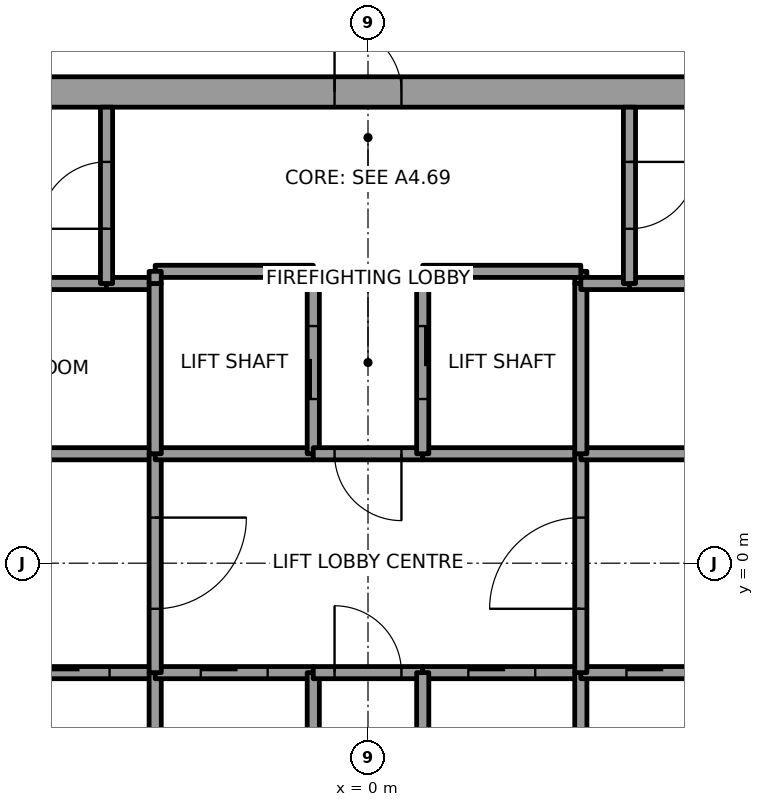
"""IFC4 building model, lengths in metres.
Left out: names, types, materials, properties, quantities, classifications, styles, units other than length and angle.
Written with IfcOpenShell. Run it as: python <this file> out.ifc"""

import sys

from ifc_helpers import new_model, si_unit, direction, frame, frame_2d, origin, place, context, subcontext, project, spatial, rectangle, extrude, element, fill, save


model = new_model("IFC4")
c1 = context("Model", 3, precision=1e-05, world=origin(), true_north=direction((0.0, 1.0)))
c2 = subcontext(c1, "Body", "Model", "MODEL_VIEW")
j1 = project(units=[si_unit("LENGTHUNIT", "METRE"), si_unit("PLANEANGLEUNIT", "RADIAN")], contexts=[c1])
p1 = place(None, origin())
s1 = spatial("IfcSite", under=j1, at=p1, CompositionType="ELEMENT")
p2 = place(p1, origin())
s2 = spatial("IfcBuilding", under=s1, at=p2, CompositionType="ELEMENT")
p3 = place(p2, frame((0.0, 0.0, 295.0)))
s3 = spatial("IfcBuildingStorey", under=s2, at=p3, CompositionType="ELEMENT", Elevation=295.0)
p4 = place(p3, frame((-11.0, 7.75, 0.0), z_axis=(0.0, 0.0, 1.0), x_axis=(1.0, 0.0, 0.0)))
e1 = element("IfcWall", 1, at=p4, inside=s3, PredefinedType="SHEAR", context=c2, shape_type="SweptSolid", body=[
    extrude(rectangle(XDim=22.0, YDim=0.5, at=frame_2d((11.0, 0.0))), origin(), (0.0, 0.0, 1.0), 4.0),
])
p5 = place(p4, frame((10.45, 0.0, 0.0)))
e2 = element("IfcOpeningElement", 2, at=p5, cuts=e1, PredefinedType="OPENING", context=c2, shape_type="SweptSolid", body=[
    extrude(rectangle(XDim=1.1, YDim=2.1, at=frame_2d((0.55, 1.05))), frame((0.0, 0.25, 0.0), z_axis=(0.0, -1.0, 0.0), x_axis=(1.0, 0.0, 0.0)), (0.0, 0.0, 1.0), 0.5),
])
p6 = place(p3, frame((-8.7, 1.8, 0.0), z_axis=(0.0, 0.0, 1.0), x_axis=(1.0, 0.0, 0.0)))
e3 = element("IfcWall", 3, at=p6, inside=s3, PredefinedType="SOLIDWALL", context=c2, shape_type="SweptSolid", body=[
    extrude(rectangle(XDim=5.2, YDim=0.2, at=frame_2d((2.6, 0.0))), origin(), (0.0, 0.0, 1.0), 3.85),
])
p7 = place(p6, frame((2.15, 0.0, 0.0)))
e4 = element("IfcOpeningElement", 4, at=p7, cuts=e3, PredefinedType="OPENING", context=c2, shape_type="SweptSolid", body=[
    extrude(rectangle(XDim=0.9, YDim=2.1, at=frame_2d((0.45, 1.05))), frame((0.0, 0.1, 0.0), z_axis=(0.0, -1.0, 0.0), x_axis=(1.0, 0.0, 0.0)), (0.0, 0.0, 1.0), 0.2),
])
p8 = place(p3, frame((-4.3, 4.6, 0.0), z_axis=(0.0, 0.0, 1.0), x_axis=(-1.0, 0.0, 0.0)))
e5 = element("IfcWall", 5, at=p8, inside=s3, PredefinedType="SOLIDWALL", context=c2, shape_type="SweptSolid", body=[
    extrude(rectangle(XDim=4.4, YDim=0.2, at=frame_2d((2.2, 0.0))), origin(), (0.0, 0.0, 1.0), 3.85),
])
p9 = place(p3, frame((-6.1, -1.8, 0.0), z_axis=(0.0, 0.0, 1.0), x_axis=(1.0, 0.0, 0.0)))
e6 = element("IfcWall", 6, at=p9, inside=s3, PredefinedType="SOLIDWALL", context=c2, shape_type="SweptSolid", body=[
    extrude(rectangle(XDim=2.6, YDim=0.2, at=frame_2d((1.3, 0.0))), origin(), (0.0, 0.0, 1.0), 3.85),
])
p10 = place(p9, frame((0.75, 0.0, 0.0)))
e7 = element("IfcOpeningElement", 7, at=p10, cuts=e6, PredefinedType="OPENING", context=c2, shape_type="SweptSolid", body=[
    extrude(rectangle(XDim=1.1, YDim=2.1, at=frame_2d((0.55, 1.05))), frame((0.0, 0.1, 0.0), z_axis=(0.0, -1.0, 0.0), x_axis=(1.0, 0.0, 0.0)), (0.0, 0.0, 1.0), 0.2),
])
p11 = place(p3, frame((-3.5, 4.6, 0.0), z_axis=(0.0, 0.0, 1.0), x_axis=(-1.0, 0.0, 0.0)))
e8 = element("IfcWall", 8, at=p11, inside=s3, PredefinedType="SOLIDWALL", context=c2, shape_type="SweptSolid", body=[
    extrude(rectangle(XDim=0.8, YDim=0.2, at=frame_2d((0.4, 0.0))), origin(), (0.0, 0.0, 1.0), 3.85),
])
p12 = place(p3, frame((-4.3, 4.6, 0.0), z_axis=(0.0, 0.0, 1.0), x_axis=(0.0, 1.0, 0.0)))
e9 = element("IfcWall", 9, at=p12, inside=s3, PredefinedType="SOLIDWALL", context=c2, shape_type="SweptSolid", body=[
    extrude(rectangle(XDim=2.9, YDim=0.2, at=frame_2d((1.45, 0.0))), origin(), (0.0, 0.0, 1.0), 3.85),
])
p13 = place(p12, frame((0.9, 0.0, 0.0)))
e10 = element("IfcOpeningElement", 10, at=p13, cuts=e9, PredefinedType="OPENING", context=c2, shape_type="SweptSolid", body=[
    extrude(rectangle(XDim=1.1, YDim=2.1, at=frame_2d((0.55, 1.05))), frame((0.0, 0.1, 0.0), z_axis=(0.0, -1.0, 0.0), x_axis=(1.0, 0.0, 0.0)), (0.0, 0.0, 1.0), 0.2),
])
p14 = place(p3, frame((-3.5, -4.6, 0.0), z_axis=(0.0, 0.0, 1.0), x_axis=(0.0, 1.0, 0.0)))
e11 = element("IfcWall", 11, at=p14, inside=s3, PredefinedType="SOLIDWALL", context=c2, shape_type="SweptSolid", body=[
    extrude(rectangle(XDim=2.8, YDim=0.2, at=frame_2d((1.4, 0.0))), origin(), (0.0, 0.0, 1.0), 3.85),
])
p15 = place(p3, frame((-3.5, -1.8, 0.0), z_axis=(0.0, 0.0, 1.0), x_axis=(1.0, 0.0, 0.0)))
e12 = element("IfcWall", 12, at=p15, inside=s3, PredefinedType="SOLIDWALL", context=c2, shape_type="SweptSolid", body=[
    extrude(rectangle(XDim=2.6, YDim=0.2, at=frame_2d((1.3, 0.0))), origin(), (0.0, 0.0, 1.0), 3.85),
])
p16 = place(p15, frame((0.75, 0.0, 0.0)))
e13 = element("IfcOpeningElement", 13, at=p16, cuts=e12, PredefinedType="OPENING", context=c2, shape_type="SweptSolid", body=[
    extrude(rectangle(XDim=1.1, YDim=2.1, at=frame_2d((0.55, 1.05))), frame((0.0, 0.1, 0.0), z_axis=(0.0, -1.0, 0.0), x_axis=(1.0, 0.0, 0.0)), (0.0, 0.0, 1.0), 0.2),
])
p17 = place(p3, frame((-3.5, 1.8, 0.0), z_axis=(0.0, 0.0, 1.0), x_axis=(0.0, -1.0, 0.0)))
e14 = element("IfcWall", 14, at=p17, inside=s3, PredefinedType="SOLIDWALL", context=c2, shape_type="SweptSolid", body=[
    extrude(rectangle(XDim=3.6, YDim=0.2, at=frame_2d((1.8, 0.0))), origin(), (0.0, 0.0, 1.0), 3.85),
])
p18 = place(p17, frame((1.05, 0.0, 0.0)))
e15 = element("IfcOpeningElement", 15, at=p18, cuts=e14, PredefinedType="OPENING", context=c2, shape_type="SweptSolid", body=[
    extrude(rectangle(XDim=1.5, YDim=2.1, at=frame_2d((0.75, 1.05))), frame((0.0, 0.1, 0.0), z_axis=(0.0, -1.0, 0.0), x_axis=(1.0, 0.0, 0.0)), (0.0, 0.0, 1.0), 0.2),
])
p19 = place(p3, frame((-0.9, 1.8, 0.0), z_axis=(0.0, 0.0, 1.0), x_axis=(-1.0, 0.0, 0.0)))
e16 = element("IfcWall", 16, at=p19, inside=s3, PredefinedType="SOLIDWALL", context=c2, shape_type="SweptSolid", body=[
    extrude(rectangle(XDim=2.6, YDim=0.2, at=frame_2d((1.3, 0.0))), origin(), (0.0, 0.0, 1.0), 3.85),
])
p20 = place(p3, frame((-3.5, 1.8, 0.0), z_axis=(0.0, 0.0, 1.0), x_axis=(0.0, 1.0, 0.0)))
e17 = element("IfcWall", 17, at=p20, inside=s3, PredefinedType="SOLIDWALL", context=c2, shape_type="SweptSolid", body=[
    extrude(rectangle(XDim=2.8, YDim=0.2, at=frame_2d((1.4, 0.0))), origin(), (0.0, 0.0, 1.0), 3.85),
])
p21 = place(p3, frame((-0.9, 1.8, 0.0), z_axis=(0.0, 0.0, 1.0), x_axis=(0.0, 1.0, 0.0)))
e18 = element("IfcWall", 18, at=p21, inside=s3, PredefinedType="SOLIDWALL", context=c2, shape_type="SweptSolid", body=[
    extrude(rectangle(XDim=3.0, YDim=0.2, at=frame_2d((1.5, 0.0))), origin(), (0.0, 0.0, 1.0), 3.85),
])
p22 = place(p21, frame((0.9, 0.0, 0.0)))
e19 = element("IfcOpeningElement", 19, at=p22, cuts=e18, PredefinedType="OPENING", context=c2, shape_type="SweptSolid", body=[
    extrude(rectangle(XDim=1.2, YDim=2.1, at=frame_2d((0.6, 1.05))), frame((0.0, 0.1, 0.0), z_axis=(0.0, -1.0, 0.0), x_axis=(1.0, 0.0, 0.0)), (0.0, 0.0, 1.0), 0.2),
])
p23 = place(p3, frame((-0.9, 4.8, 0.0), z_axis=(0.0, 0.0, 1.0), x_axis=(-1.0, 0.0, 0.0)))
e20 = element("IfcWall", 20, at=p23, inside=s3, PredefinedType="SOLIDWALL", context=c2, shape_type="SweptSolid", body=[
    extrude(rectangle(XDim=2.6, YDim=0.2, at=frame_2d((1.3, 0.0))), origin(), (0.0, 0.0, 1.0), 3.85),
])
p24 = place(p3, frame((-3.5, 4.8, 0.0), z_axis=(0.0, 0.0, 1.0), x_axis=(0.0, -1.0, 0.0)))
e21 = element("IfcWall", 21, at=p24, inside=s3, PredefinedType="SOLIDWALL", context=c2, shape_type="SweptSolid", body=[
    extrude(rectangle(XDim=0.2, YDim=0.2, at=frame_2d((0.1, 0.0))), origin(), (0.0, 0.0, 1.0), 3.85),
])
p25 = place(p3, frame((-0.9, -4.6, 0.0), z_axis=(0.0, 0.0, 1.0), x_axis=(0.0, 1.0, 0.0)))
e22 = element("IfcWall", 22, at=p25, inside=s3, PredefinedType="SOLIDWALL", context=c2, shape_type="SweptSolid", body=[
    extrude(rectangle(XDim=2.8, YDim=0.2, at=frame_2d((1.4, 0.0))), origin(), (0.0, 0.0, 1.0), 3.85),
])
p26 = place(p3, frame((-0.9, -1.8, 0.0), z_axis=(0.0, 0.0, 1.0), x_axis=(1.0, 0.0, 0.0)))
e23 = element("IfcWall", 23, at=p26, inside=s3, PredefinedType="SOLIDWALL", context=c2, shape_type="SweptSolid", body=[
    extrude(rectangle(XDim=1.8, YDim=0.2, at=frame_2d((0.9, 0.0))), origin(), (0.0, 0.0, 1.0), 3.85),
])
p27 = place(p26, frame((0.35, 0.0, 0.0)))
e24 = element("IfcOpeningElement", 24, at=p27, cuts=e23, PredefinedType="OPENING", context=c2, shape_type="SweptSolid", body=[
    extrude(rectangle(XDim=1.1, YDim=2.1, at=frame_2d((0.55, 1.05))), frame((0.0, 0.1, 0.0), z_axis=(0.0, -1.0, 0.0), x_axis=(1.0, 0.0, 0.0)), (0.0, 0.0, 1.0), 0.2),
])
p28 = place(p3, frame((0.9, 1.8, 0.0), z_axis=(0.0, 0.0, 1.0), x_axis=(-1.0, 0.0, 0.0)))
e25 = element("IfcWall", 25, at=p28, inside=s3, PredefinedType="SOLIDWALL", context=c2, shape_type="SweptSolid", body=[
    extrude(rectangle(XDim=1.8, YDim=0.2, at=frame_2d((0.9, 0.0))), origin(), (0.0, 0.0, 1.0), 3.85),
])
p29 = place(p28, frame((0.35, 0.0, 0.0)))
e26 = element("IfcOpeningElement", 26, at=p29, cuts=e25, PredefinedType="OPENING", context=c2, shape_type="SweptSolid", body=[
    extrude(rectangle(XDim=1.1, YDim=2.1, at=frame_2d((0.55, 1.05))), frame((0.0, 0.1, 0.0), z_axis=(0.0, -1.0, 0.0), x_axis=(1.0, 0.0, 0.0)), (0.0, 0.0, 1.0), 0.2),
])
p30 = place(p3, frame((0.9, -1.8, 0.0), z_axis=(0.0, 0.0, 1.0), x_axis=(1.0, 0.0, 0.0)))
e27 = element("IfcWall", 27, at=p30, inside=s3, PredefinedType="SOLIDWALL", context=c2, shape_type="SweptSolid", body=[
    extrude(rectangle(XDim=2.6, YDim=0.2, at=frame_2d((1.3, 0.0))), origin(), (0.0, 0.0, 1.0), 3.85),
])
p31 = place(p30, frame((0.75, 0.0, 0.0)))
e28 = element("IfcOpeningElement", 28, at=p31, cuts=e27, PredefinedType="OPENING", context=c2, shape_type="SweptSolid", body=[
    extrude(rectangle(XDim=1.1, YDim=2.1, at=frame_2d((0.55, 1.05))), frame((0.0, 0.1, 0.0), z_axis=(0.0, -1.0, 0.0), x_axis=(1.0, 0.0, 0.0)), (0.0, 0.0, 1.0), 0.2),
])
p32 = place(p3, frame((0.9, -1.8, 0.0), z_axis=(0.0, 0.0, 1.0), x_axis=(0.0, -1.0, 0.0)))
e29 = element("IfcWall", 29, at=p32, inside=s3, PredefinedType="SOLIDWALL", context=c2, shape_type="SweptSolid", body=[
    extrude(rectangle(XDim=2.8, YDim=0.2, at=frame_2d((1.4, 0.0))), origin(), (0.0, 0.0, 1.0), 3.85),
])
p33 = place(p3, frame((3.5, 1.8, 0.0), z_axis=(0.0, 0.0, 1.0), x_axis=(-1.0, 0.0, 0.0)))
e30 = element("IfcWall", 30, at=p33, inside=s3, PredefinedType="SOLIDWALL", context=c2, shape_type="SweptSolid", body=[
    extrude(rectangle(XDim=2.6, YDim=0.2, at=frame_2d((1.3, 0.0))), origin(), (0.0, 0.0, 1.0), 3.85),
])
p34 = place(p3, frame((3.5, 4.6, 0.0), z_axis=(0.0, 0.0, 1.0), x_axis=(0.0, 1.0, 0.0)))
e31 = element("IfcWall", 31, at=p34, inside=s3, PredefinedType="SOLIDWALL", context=c2, shape_type="SweptSolid", body=[
    extrude(rectangle(XDim=0.2, YDim=0.2, at=frame_2d((0.1, 0.0))), origin(), (0.0, 0.0, 1.0), 3.85),
])
p35 = place(p3, frame((3.5, 4.8, 0.0), z_axis=(0.0, 0.0, 1.0), x_axis=(-1.0, 0.0, 0.0)))
e32 = element("IfcWall", 32, at=p35, inside=s3, PredefinedType="SOLIDWALL", context=c2, shape_type="SweptSolid", body=[
    extrude(rectangle(XDim=2.6, YDim=0.2, at=frame_2d((1.3, 0.0))), origin(), (0.0, 0.0, 1.0), 3.85),
])
p36 = place(p3, frame((0.9, 4.8, 0.0), z_axis=(0.0, 0.0, 1.0), x_axis=(0.0, -1.0, 0.0)))
e33 = element("IfcWall", 33, at=p36, inside=s3, PredefinedType="SOLIDWALL", context=c2, shape_type="SweptSolid", body=[
    extrude(rectangle(XDim=3.0, YDim=0.2, at=frame_2d((1.5, 0.0))), origin(), (0.0, 0.0, 1.0), 3.85),
])
p37 = place(p36, frame((0.9, 0.0, 0.0)))
e34 = element("IfcOpeningElement", 34, at=p37, cuts=e33, PredefinedType="OPENING", context=c2, shape_type="SweptSolid", body=[
    extrude(rectangle(XDim=1.2, YDim=2.1, at=frame_2d((0.6, 1.05))), frame((0.0, 0.1, 0.0), z_axis=(0.0, -1.0, 0.0), x_axis=(1.0, 0.0, 0.0)), (0.0, 0.0, 1.0), 0.2),
])
p38 = place(p3, frame((3.5, -4.6, 0.0), z_axis=(0.0, 0.0, 1.0), x_axis=(0.0, 1.0, 0.0)))
e35 = element("IfcWall", 35, at=p38, inside=s3, PredefinedType="SOLIDWALL", context=c2, shape_type="SweptSolid", body=[
    extrude(rectangle(XDim=2.8, YDim=0.2, at=frame_2d((1.4, 0.0))), origin(), (0.0, 0.0, 1.0), 3.85),
])
p39 = place(p3, frame((3.5, -1.8, 0.0), z_axis=(0.0, 0.0, 1.0), x_axis=(1.0, 0.0, 0.0)))
e36 = element("IfcWall", 36, at=p39, inside=s3, PredefinedType="SOLIDWALL", context=c2, shape_type="SweptSolid", body=[
    extrude(rectangle(XDim=2.6, YDim=0.2, at=frame_2d((1.3, 0.0))), origin(), (0.0, 0.0, 1.0), 3.85),
])
p40 = place(p39, frame((0.75, 0.0, 0.0)))
e37 = element("IfcOpeningElement", 37, at=p40, cuts=e36, PredefinedType="OPENING", context=c2, shape_type="SweptSolid", body=[
    extrude(rectangle(XDim=1.1, YDim=2.1, at=frame_2d((0.55, 1.05))), frame((0.0, 0.1, 0.0), z_axis=(0.0, -1.0, 0.0), x_axis=(1.0, 0.0, 0.0)), (0.0, 0.0, 1.0), 0.2),
])
p41 = place(p3, frame((3.5, -1.8, 0.0), z_axis=(0.0, 0.0, 1.0), x_axis=(0.0, 1.0, 0.0)))
e38 = element("IfcWall", 38, at=p41, inside=s3, PredefinedType="SOLIDWALL", context=c2, shape_type="SweptSolid", body=[
    extrude(rectangle(XDim=3.6, YDim=0.2, at=frame_2d((1.8, 0.0))), origin(), (0.0, 0.0, 1.0), 3.85),
])
p42 = place(p41, frame((1.05, 0.0, 0.0)))
e39 = element("IfcOpeningElement", 39, at=p42, cuts=e38, PredefinedType="OPENING", context=c2, shape_type="SweptSolid", body=[
    extrude(rectangle(XDim=1.5, YDim=2.1, at=frame_2d((0.75, 1.05))), frame((0.0, 0.1, 0.0), z_axis=(0.0, -1.0, 0.0), x_axis=(1.0, 0.0, 0.0)), (0.0, 0.0, 1.0), 0.2),
])
p43 = place(p3, frame((3.5, 1.8, 0.0), z_axis=(0.0, 0.0, 1.0), x_axis=(1.0, 0.0, 0.0)))
e40 = element("IfcWall", 40, at=p43, inside=s3, PredefinedType="SOLIDWALL", context=c2, shape_type="SweptSolid", body=[
    extrude(rectangle(XDim=5.2, YDim=0.2, at=frame_2d((2.6, 0.0))), origin(), (0.0, 0.0, 1.0), 3.85),
])
p44 = place(p43, frame((2.15, 0.0, 0.0)))
e41 = element("IfcOpeningElement", 41, at=p44, cuts=e40, PredefinedType="OPENING", context=c2, shape_type="SweptSolid", body=[
    extrude(rectangle(XDim=0.9, YDim=2.1, at=frame_2d((0.45, 1.05))), frame((0.0, 0.1, 0.0), z_axis=(0.0, -1.0, 0.0), x_axis=(1.0, 0.0, 0.0)), (0.0, 0.0, 1.0), 0.2),
])
p45 = place(p3, frame((3.5, 4.6, 0.0), z_axis=(0.0, 0.0, 1.0), x_axis=(0.0, -1.0, 0.0)))
e42 = element("IfcWall", 42, at=p45, inside=s3, PredefinedType="SOLIDWALL", context=c2, shape_type="SweptSolid", body=[
    extrude(rectangle(XDim=2.8, YDim=0.2, at=frame_2d((1.4, 0.0))), origin(), (0.0, 0.0, 1.0), 3.85),
])
p46 = place(p3, frame((4.3, 4.6, 0.0), z_axis=(0.0, 0.0, 1.0), x_axis=(-1.0, 0.0, 0.0)))
e43 = element("IfcWall", 43, at=p46, inside=s3, PredefinedType="SOLIDWALL", context=c2, shape_type="SweptSolid", body=[
    extrude(rectangle(XDim=0.8, YDim=0.2, at=frame_2d((0.4, 0.0))), origin(), (0.0, 0.0, 1.0), 3.85),
])
p47 = place(p3, frame((8.7, 4.6, 0.0), z_axis=(0.0, 0.0, 1.0), x_axis=(-1.0, 0.0, 0.0)))
e44 = element("IfcWall", 44, at=p47, inside=s3, PredefinedType="SOLIDWALL", context=c2, shape_type="SweptSolid", body=[
    extrude(rectangle(XDim=4.4, YDim=0.2, at=frame_2d((2.2, 0.0))), origin(), (0.0, 0.0, 1.0), 3.85),
])
p48 = place(p3, frame((4.3, 7.5, 0.0), z_axis=(0.0, 0.0, 1.0), x_axis=(0.0, -1.0, 0.0)))
e45 = element("IfcWall", 45, at=p48, inside=s3, PredefinedType="SOLIDWALL", context=c2, shape_type="SweptSolid", body=[
    extrude(rectangle(XDim=2.9, YDim=0.2, at=frame_2d((1.45, 0.0))), origin(), (0.0, 0.0, 1.0), 3.85),
])
p49 = place(p48, frame((0.9, 0.0, 0.0)))
e46 = element("IfcOpeningElement", 46, at=p49, cuts=e45, PredefinedType="OPENING", context=c2, shape_type="SweptSolid", body=[
    extrude(rectangle(XDim=1.1, YDim=2.1, at=frame_2d((0.55, 1.05))), frame((0.0, 0.1, 0.0), z_axis=(0.0, -1.0, 0.0), x_axis=(1.0, 0.0, 0.0)), (0.0, 0.0, 1.0), 0.2),
])
p50 = place(p10, origin())
e47 = element("IfcDoor", 47, at=p50, inside=s3, OperationType="SLIDING_TO_RIGHT", PredefinedType="DOOR", context=c2, shape_type="SweptSolid", body=[
    extrude(rectangle(XDim=1.1, YDim=2.1, at=frame_2d((0.55, 1.05))), frame((0.0, 0.025, 0.0), z_axis=(0.0, -1.0, 0.0), x_axis=(1.0, 0.0, 0.0)), (0.0, 0.0, 1.0), 0.05),
])
fill(e7, e47)
p51 = place(p16, origin())
e48 = element("IfcDoor", 48, at=p51, inside=s3, OperationType="SLIDING_TO_RIGHT", PredefinedType="DOOR", context=c2, shape_type="SweptSolid", body=[
    extrude(rectangle(XDim=1.1, YDim=2.1, at=frame_2d((0.55, 1.05))), frame((0.0, 0.025, 0.0), z_axis=(0.0, -1.0, 0.0), x_axis=(1.0, 0.0, 0.0)), (0.0, 0.0, 1.0), 0.05),
])
fill(e13, e48)
p52 = place(p31, origin())
e49 = element("IfcDoor", 49, at=p52, inside=s3, OperationType="SLIDING_TO_LEFT", PredefinedType="DOOR", context=c2, shape_type="SweptSolid", body=[
    extrude(rectangle(XDim=1.1, YDim=2.1, at=frame_2d((0.55, 1.05))), frame((0.0, 0.025, 0.0), z_axis=(0.0, -1.0, 0.0), x_axis=(1.0, 0.0, 0.0)), (0.0, 0.0, 1.0), 0.05),
])
fill(e28, e49)
p53 = place(p40, origin())
e50 = element("IfcDoor", 50, at=p53, inside=s3, OperationType="SLIDING_TO_LEFT", PredefinedType="DOOR", context=c2, shape_type="SweptSolid", body=[
    extrude(rectangle(XDim=1.1, YDim=2.1, at=frame_2d((0.55, 1.05))), frame((0.0, 0.025, 0.0), z_axis=(0.0, -1.0, 0.0), x_axis=(1.0, 0.0, 0.0)), (0.0, 0.0, 1.0), 0.05),
])
fill(e37, e50)
p54 = place(p22, origin())
e51 = element("IfcDoor", 51, at=p54, inside=s3, OperationType="SLIDING_TO_RIGHT", PredefinedType="DOOR", context=c2, shape_type="SweptSolid", body=[
    extrude(rectangle(XDim=1.2, YDim=2.1, at=frame_2d((0.6, 1.05))), frame((0.0, 0.025, 0.0), z_axis=(0.0, -1.0, 0.0), x_axis=(1.0, 0.0, 0.0)), (0.0, 0.0, 1.0), 0.05),
])
fill(e19, e51)
p55 = place(p37, origin())
e52 = element("IfcDoor", 52, at=p55, inside=s3, OperationType="SLIDING_TO_RIGHT", PredefinedType="DOOR", context=c2, shape_type="SweptSolid", body=[
    extrude(rectangle(XDim=1.2, YDim=2.1, at=frame_2d((0.6, 1.05))), frame((0.0, 0.025, 0.0), z_axis=(0.0, -1.0, 0.0), x_axis=(1.0, 0.0, 0.0)), (0.0, 0.0, 1.0), 0.05),
])
fill(e34, e52)
p56 = place(p18, origin())
e53 = element("IfcDoor", 53, at=p56, inside=s3, OperationType="DOUBLE_DOOR_SINGLE_SWING", PredefinedType="DOOR", context=c2, shape_type="SweptSolid", body=[
    extrude(rectangle(XDim=1.5, YDim=2.1, at=frame_2d((0.75, 1.05))), frame((0.0, 0.025, 0.0), z_axis=(0.0, -1.0, 0.0), x_axis=(1.0, 0.0, 0.0)), (0.0, 0.0, 1.0), 0.05),
])
fill(e15, e53)
p57 = place(p42, origin())
e54 = element("IfcDoor", 54, at=p57, inside=s3, OperationType="DOUBLE_DOOR_SINGLE_SWING", PredefinedType="DOOR", context=c2, shape_type="SweptSolid", body=[
    extrude(rectangle(XDim=1.5, YDim=2.1, at=frame_2d((0.75, 1.05))), frame((0.0, 0.025, 0.0), z_axis=(0.0, -1.0, 0.0), x_axis=(1.0, 0.0, 0.0)), (0.0, 0.0, 1.0), 0.05),
])
fill(e39, e54)
p58 = place(p29, origin())
e55 = element("IfcDoor", 55, at=p58, inside=s3, OperationType="SINGLE_SWING_RIGHT", PredefinedType="DOOR", context=c2, shape_type="SweptSolid", body=[
    extrude(rectangle(XDim=1.1, YDim=2.1, at=frame_2d((0.55, 1.05))), frame((0.0, 0.025, 0.0), z_axis=(0.0, -1.0, 0.0), x_axis=(1.0, 0.0, 0.0)), (0.0, 0.0, 1.0), 0.05),
])
fill(e26, e55)
p59 = place(p27, origin())
e56 = element("IfcDoor", 56, at=p59, inside=s3, OperationType="SINGLE_SWING_RIGHT", PredefinedType="DOOR", context=c2, shape_type="SweptSolid", body=[
    extrude(rectangle(XDim=1.1, YDim=2.1, at=frame_2d((0.55, 1.05))), frame((0.0, 0.025, 0.0), z_axis=(0.0, -1.0, 0.0), x_axis=(1.0, 0.0, 0.0)), (0.0, 0.0, 1.0), 0.05),
])
fill(e24, e56)
p60 = place(p13, origin())
e57 = element("IfcDoor", 57, at=p60, inside=s3, OperationType="SINGLE_SWING_LEFT", PredefinedType="DOOR", context=c2, shape_type="SweptSolid", body=[
    extrude(rectangle(XDim=1.1, YDim=2.1, at=frame_2d((0.55, 1.05))), frame((0.0, 0.025, 0.0), z_axis=(0.0, -1.0, 0.0), x_axis=(1.0, 0.0, 0.0)), (0.0, 0.0, 1.0), 0.05),
])
fill(e10, e57)
p61 = place(p49, origin())
e58 = element("IfcDoor", 58, at=p61, inside=s3, OperationType="SINGLE_SWING_LEFT", PredefinedType="DOOR", context=c2, shape_type="SweptSolid", body=[
    extrude(rectangle(XDim=1.1, YDim=2.1, at=frame_2d((0.55, 1.05))), frame((0.0, 0.025, 0.0), z_axis=(0.0, -1.0, 0.0), x_axis=(1.0, 0.0, 0.0)), (0.0, 0.0, 1.0), 0.05),
])
fill(e46, e58)
p62 = place(p5, origin())
e59 = element("IfcDoor", 59, at=p62, inside=s3, OperationType="SINGLE_SWING_RIGHT", PredefinedType="DOOR", context=c2, shape_type="SweptSolid", body=[
    extrude(rectangle(XDim=1.1, YDim=2.1, at=frame_2d((0.55, 1.05))), frame((0.0, 0.025, 0.0), z_axis=(0.0, -1.0, 0.0), x_axis=(1.0, 0.0, 0.0)), (0.0, 0.0, 1.0), 0.05),
])
fill(e2, e59)
save(model, sys.argv[1])
